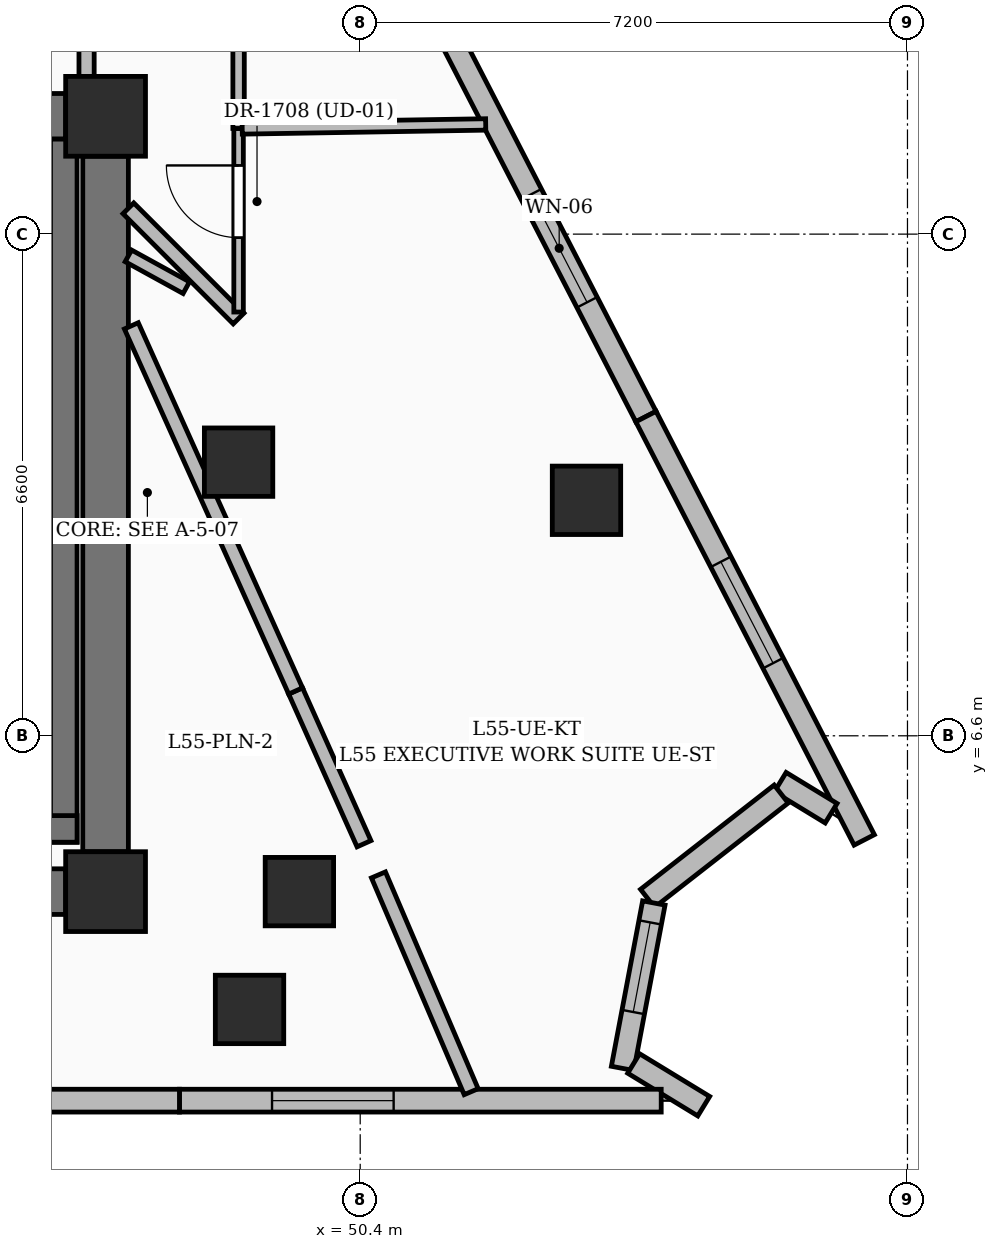
"""IFC4 building model, lengths in metres.
Left out: names, types, materials, properties, quantities, classifications, styles, units other than length and angle.
Written with IfcOpenShell. Run it as: python <this file> out.ifc"""

import sys

from ifc_helpers import new_model, si_unit, direction, frame, frame_2d, origin, origin_2d, place, context, subcontext, project, spatial, rectangle, extrude, element, fill, save


model = new_model("IFC4")
c1 = context("Model", 3, precision=1e-05, world=origin(), true_north=direction((0.0, 1.0)))
c2 = subcontext(c1, "Body", "Model", "MODEL_VIEW")
j1 = project(units=[si_unit("LENGTHUNIT", "METRE"), si_unit("PLANEANGLEUNIT", "RADIAN")], contexts=[c1])
p1 = place(None, origin())
s1 = spatial("IfcSite", under=j1, at=p1, CompositionType="ELEMENT")
p2 = place(p1, origin())
s2 = spatial("IfcBuilding", under=s1, at=p2, CompositionType="ELEMENT")
p3 = place(p2, frame((0.0, 0.0, 214.5)))
s3 = spatial("IfcBuildingStorey", under=s2, at=p3, CompositionType="ELEMENT", Elevation=214.5)
for number, where, z_axis, x_axis in (
    (1, (47.05, 4.55, 0.0), (0.0, 0.0, 1.0), (1.0, 0.0, 0.0)),
    (2, (47.05, 14.75, 0.0), (0.0, 0.0, 1.0), (1.0, 0.0, 0.0)),
):
    element("IfcColumn", number, at=place(p3, frame(where, z_axis=z_axis, x_axis=x_axis)), inside=s3, PredefinedType="COLUMN", context=c2, shape_type="SweptSolid", body=[
        extrude(rectangle(XDim=1.05, YDim=1.05, at=origin_2d()), origin(), (0.0, 0.0, 1.0), 3.75),
    ])
for number, where, z_axis, x_axis in (
    (3, (49.6, 4.55, 0.0), (0.0, 0.0, 1.0), (1.0, 0.0, 0.0)),
    (4, (48.8, 10.2, 0.0), (0.0, 0.0, 1.0), (1.0, 0.0, 0.0)),
):
    element("IfcColumn", number, at=place(p3, frame(where, z_axis=z_axis, x_axis=x_axis)), inside=s3, PredefinedType="COLUMN", context=c2, shape_type="SweptSolid", body=[
        extrude(rectangle(XDim=0.9, YDim=0.9, at=origin_2d()), origin(), (0.0, 0.0, 1.0), 3.75),
    ])
p4 = place(p3, frame((35.675, 4.55, 0.0), z_axis=(0.0, 0.0, 1.0), x_axis=(1.0, 0.0, 0.0)))
e5 = element("IfcWall", 5, at=p4, inside=s3, PredefinedType="SHEAR", context=c2, shape_type="SweptSolid", body=[
    extrude(rectangle(XDim=10.85, YDim=0.6, at=frame_2d((5.425, 0.0))), origin(), (0.0, 0.0, 1.0), 3.75),
])
p5 = place(p3, frame((35.675, 14.75, 0.0), z_axis=(0.0, 0.0, 1.0), x_axis=(1.0, 0.0, 0.0)))
e6 = element("IfcWall", 6, at=p5, inside=s3, PredefinedType="SHEAR", context=c2, shape_type="SweptSolid", body=[
    extrude(rectangle(XDim=10.85, YDim=0.6, at=frame_2d((5.425, 0.0))), origin(), (0.0, 0.0, 1.0), 3.75),
])
p6 = place(p5, frame((1.1, 0.0, 0.0)))
e7 = element("IfcOpeningElement", 7, at=p6, cuts=e6, PredefinedType="OPENING", context=c2, shape_type="SweptSolid", body=[
    extrude(rectangle(XDim=1.05, YDim=2.15, at=frame_2d((0.525, 1.075))), frame((0.0, 0.31, 0.0), z_axis=(0.0, -1.0, 0.0), x_axis=(1.0, 0.0, 0.0)), (0.0, 0.0, 1.0), 0.62),
])
p7 = place(p5, frame((8.7, 0.0, 0.0)))
e8 = element("IfcOpeningElement", 8, at=p7, cuts=e6, PredefinedType="OPENING", context=c2, shape_type="SweptSolid", body=[
    extrude(rectangle(XDim=1.05, YDim=2.15, at=frame_2d((0.525, 1.075))), frame((0.0, 0.31, 0.0), z_axis=(0.0, -1.0, 0.0), x_axis=(1.0, 0.0, 0.0)), (0.0, 0.0, 1.0), 0.62),
])
p8 = place(p5, frame((3.825, 0.0, 0.0)))
e9 = element("IfcOpeningElement", 9, at=p8, cuts=e6, PredefinedType="OPENING", context=c2, shape_type="SweptSolid", body=[
    extrude(rectangle(XDim=1.2, YDim=2.2, at=frame_2d((0.6, 1.1))), frame((0.0, 0.31, 0.0), z_axis=(0.0, -1.0, 0.0), x_axis=(1.0, 0.0, 0.0)), (0.0, 0.0, 1.0), 0.62),
])
p9 = place(p5, frame((5.825, 0.0, 0.0)))
e10 = element("IfcOpeningElement", 10, at=p9, cuts=e6, PredefinedType="OPENING", context=c2, shape_type="SweptSolid", body=[
    extrude(rectangle(XDim=1.2, YDim=2.2, at=frame_2d((0.6, 1.1))), frame((0.0, 0.31, 0.0), z_axis=(0.0, -1.0, 0.0), x_axis=(1.0, 0.0, 0.0)), (0.0, 0.0, 1.0), 0.62),
])
p10 = place(p3, frame((47.05, 5.075, 0.0), z_axis=(0.0, 0.0, 1.0), x_axis=(0.0, 1.0, 0.0)))
e11 = element("IfcWall", 11, at=p10, inside=s3, PredefinedType="SHEAR", context=c2, shape_type="SweptSolid", body=[
    extrude(rectangle(XDim=9.15, YDim=0.6, at=frame_2d((4.575, 0.0))), origin(), (0.0, 0.0, 1.0), 3.75),
])
p11 = place(p3, frame((46.5, 5.2, 0.0), z_axis=(0.0, 0.0, 1.0), x_axis=(0.0, 1.0, 0.0)))
e12 = element("IfcWall", 12, at=p11, inside=s3, PredefinedType="SOLIDWALL", context=c2, shape_type="SweptSolid", body=[
    extrude(rectangle(XDim=9.25, YDim=0.35, at=frame_2d((4.625, 0.0))), origin(), (0.0, 0.0, 1.0), 3.75),
])
p12 = place(p3, frame((43.125, 5.375, 0.0), z_axis=(0.0, 0.0, 1.0), x_axis=(1.0, 0.0, 0.0)))
e13 = element("IfcWall", 13, at=p12, inside=s3, PredefinedType="SOLIDWALL", context=c2, shape_type="SweptSolid", body=[
    extrude(rectangle(XDim=3.55, YDim=0.35, at=frame_2d((1.775, 0.0))), origin(), (0.0, 0.0, 1.0), 3.75),
])
for number, where, z_axis, x_axis in (
    (14, (48.944, 3.0, 0.0), (0.0, 0.0, 1.0), (1.0, 0.0, 0.0)),
    (15, (53.377, 9.698, 0.0), (0.0, 0.0, 1.0), (1.0, 0.0, 0.0)),
):
    element("IfcColumn", number, at=place(p3, frame(where, z_axis=z_axis, x_axis=x_axis)), inside=s3, PredefinedType="COLUMN", context=c2, shape_type="SweptSolid", body=[
        extrude(rectangle(XDim=0.9, YDim=0.9, at=origin_2d()), origin(), (0.0, 0.0, 1.0), 3.75),
    ])
p13 = place(p3, frame((51.288, 16.369, 0.0), z_axis=(0.0, 0.0, 1.0), x_axis=(0.458306446078, -0.88879424024, 0.0)))
e16 = element("IfcWall", 16, at=p13, inside=s3, PredefinedType="SOLIDWALL", context=c2, shape_type="SweptSolid", body=[
    extrude(rectangle(XDim=6.266, YDim=0.3, at=frame_2d((3.133, 0.0))), origin(), (0.0, 0.0, 1.0), 3.5),
])
p14 = place(p13, frame((2.975, 0.0, 0.55)))
e17 = element("IfcOpeningElement", 17, at=p14, cuts=e16, PredefinedType="OPENING", context=c2, shape_type="SweptSolid", body=[
    extrude(rectangle(XDim=1.6, YDim=2.2, at=frame_2d((0.8, 1.1))), frame((0.0, 0.16, 0.0), z_axis=(0.0, -1.0, 0.0), x_axis=(1.0, 0.0, 0.0)), (0.0, 0.0, 1.0), 0.32),
])
p15 = place(p3, frame((54.159, 10.8, 0.0), z_axis=(0.0, 0.0, 1.0), x_axis=(0.458322317218, -0.888786056113, 0.0)))
e18 = element("IfcWall", 18, at=p15, inside=s3, PredefinedType="SOLIDWALL", context=c2, shape_type="SweptSolid", body=[
    extrude(rectangle(XDim=6.266, YDim=0.3, at=frame_2d((3.133, 0.0))), origin(), (0.0, 0.0, 1.0), 3.5),
])
p16 = place(p15, frame((2.15, 0.0, 0.6)))
e19 = element("IfcOpeningElement", 19, at=p16, cuts=e18, PredefinedType="OPENING", context=c2, shape_type="SweptSolid", body=[
    extrude(rectangle(XDim=1.5, YDim=2.1, at=frame_2d((0.75, 1.05))), frame((0.0, 0.16, 0.0), z_axis=(0.0, -1.0, 0.0), x_axis=(1.0, 0.0, 0.0)), (0.0, 0.0, 1.0), 0.32),
])
p17 = place(p3, frame((56.595, 5.581, 0.0), z_axis=(0.0, 0.0, 1.0), x_axis=(-0.853681479387, 0.520795479772, 0.0)))
e20 = element("IfcWall", 20, at=p17, inside=s3, PredefinedType="SOLIDWALL", context=c2, shape_type="SweptSolid", body=[
    extrude(rectangle(XDim=0.785, YDim=0.3, at=frame_2d((0.392, 0.0))), origin(), (0.0, 0.0, 1.0), 3.5),
])
p18 = place(p3, frame((55.939, 5.834, 0.0), z_axis=(0.0, 0.0, 1.0), x_axis=(-0.788331324268, -0.615250943256, 0.0)))
e21 = element("IfcWall", 21, at=p18, inside=s3, PredefinedType="SOLIDWALL", context=c2, shape_type="SweptSolid", body=[
    extrude(rectangle(XDim=2.23, YDim=0.3, at=frame_2d((1.115, 0.0))), origin(), (0.0, 0.0, 1.0), 3.5),
])
p19 = place(p3, frame((54.263, 4.401, 0.0), z_axis=(0.0, 0.0, 1.0), x_axis=(-0.185632792315, -0.982619186876, 0.0)))
e22 = element("IfcWall", 22, at=p19, inside=s3, PredefinedType="SOLIDWALL", context=c2, shape_type="SweptSolid", body=[
    extrude(rectangle(XDim=2.215, YDim=0.3, at=frame_2d((1.107, 0.0))), origin(), (0.0, 0.0, 1.0), 3.5),
])
p20 = place(p19, frame((0.26, 0.0, 0.8)))
e23 = element("IfcOpeningElement", 23, at=p20, cuts=e22, PredefinedType="OPENING", context=c2, shape_type="SweptSolid", body=[
    extrude(rectangle(XDim=1.2, YDim=1.8, at=frame_2d((0.6, 0.9))), frame((0.0, 0.16, 0.0), z_axis=(0.0, -1.0, 0.0), x_axis=(1.0, 0.0, 0.0)), (0.0, 0.0, 1.0), 0.32),
])
p21 = place(p3, frame((53.998, 2.289, 0.0), z_axis=(0.0, 0.0, 1.0), x_axis=(0.853840299064, -0.520535055203, 0.0)))
e24 = element("IfcWall", 24, at=p21, inside=s3, PredefinedType="SOLIDWALL", context=c2, shape_type="SweptSolid", body=[
    extrude(rectangle(XDim=1.08, YDim=0.3, at=frame_2d((0.54, 0.0))), origin(), (0.0, 0.0, 1.0), 3.5),
])
p22 = place(p3, frame((54.36, 1.8, 0.0), z_axis=(0.0, 0.0, 1.0), x_axis=(-1.0, 0.0, 0.0)))
e25 = element("IfcWall", 25, at=p22, inside=s3, PredefinedType="SOLIDWALL", context=c2, shape_type="SweptSolid", body=[
    extrude(rectangle(XDim=6.338, YDim=0.3, at=frame_2d((3.169, 0.0))), origin(), (0.0, 0.0, 1.0), 3.5),
])
p23 = place(p22, frame((3.52, 0.0, 0.55)))
e26 = element("IfcOpeningElement", 26, at=p23, cuts=e25, PredefinedType="OPENING", context=c2, shape_type="SweptSolid", body=[
    extrude(rectangle(XDim=1.6, YDim=2.2, at=frame_2d((0.8, 1.1))), frame((0.0, 0.16, 0.0), z_axis=(0.0, -1.0, 0.0), x_axis=(1.0, 0.0, 0.0)), (0.0, 0.0, 1.0), 0.32),
])
p24 = place(p3, frame((48.022, 1.8, 0.0), z_axis=(0.0, 0.0, 1.0), x_axis=(-1.0, 0.0, 0.0)))
e27 = element("IfcWall", 27, at=p24, inside=s3, PredefinedType="SOLIDWALL", context=c2, shape_type="SweptSolid", body=[
    extrude(rectangle(XDim=6.918, YDim=0.3, at=frame_2d((3.459, 0.0))), origin(), (0.0, 0.0, 1.0), 3.5),
])
p25 = place(p24, frame((3.025, 0.0, 0.6)))
e28 = element("IfcOpeningElement", 28, at=p25, cuts=e27, PredefinedType="OPENING", context=c2, shape_type="SweptSolid", body=[
    extrude(rectangle(XDim=1.5, YDim=2.1, at=frame_2d((0.75, 1.05))), frame((0.0, 0.16, 0.0), z_axis=(0.0, -1.0, 0.0), x_axis=(1.0, 0.0, 0.0)), (0.0, 0.0, 1.0), 0.32),
])
p26 = place(p3, frame((46.8, 15.05, 0.0), z_axis=(0.0, 0.0, 1.0), x_axis=(0.0, 1.0, 0.0)))
e29 = element("IfcWall", 29, at=p26, inside=s3, PredefinedType="PARTITIONING", context=c2, shape_type="SweptSolid", body=[
    extrude(rectangle(XDim=1.7, YDim=0.2, at=frame_2d((0.85, 0.0))), origin(), (0.0, 0.0, 1.0), 2.685),
])
p27 = place(p3, frame((50.45, 5.18, 0.0), z_axis=(0.0, 0.0, 1.0), x_axis=(-0.408626143047, 0.912701854506, 0.0)))
e30 = element("IfcWall", 30, at=p27, inside=s3, PredefinedType="PARTITIONING", context=c2, shape_type="SweptSolid", body=[
    extrude(rectangle(XDim=2.202, YDim=0.2, at=frame_2d((1.101, 0.0))), origin(), (0.0, 0.0, 1.0), 2.82),
])
p28 = place(p3, frame((51.86, 1.918, 0.0), z_axis=(0.0, 0.0, 1.0), x_axis=(-0.393349316575, 0.919389098886, 0.0)))
e31 = element("IfcWall", 31, at=p28, inside=s3, PredefinedType="PARTITIONING", context=c2, shape_type="SweptSolid", body=[
    extrude(rectangle(XDim=3.102, YDim=0.2, at=frame_2d((1.551, 0.0))), origin(), (0.0, 0.0, 1.0), 3.5),
])
p29 = place(p3, frame((49.55, 7.19, 0.0), z_axis=(0.0, 0.0, 1.0), x_axis=(-0.410297221829, 0.91195185715, 0.0)))
e32 = element("IfcWall", 32, at=p29, inside=s3, PredefinedType="PARTITIONING", context=c2, shape_type="SweptSolid", body=[
    extrude(rectangle(XDim=5.267, YDim=0.2, at=frame_2d((2.634, 0.0))), origin(), (0.0, 0.0, 1.0), 2.685),
])
p30 = place(p3, frame((48.8, 12.09, 0.0), z_axis=(0.0, 0.0, 1.0), x_axis=(-0.707106781187, 0.707106781187, 0.0)))
e33 = element("IfcWall", 33, at=p30, inside=s3, PredefinedType="PARTITIONING", context=c2, shape_type="SweptSolid", body=[
    extrude(rectangle(XDim=2.051, YDim=0.2, at=frame_2d((1.025, 0.0))), origin(), (0.0, 0.0, 1.0), 3.5),
])
p31 = place(p3, frame((48.8, 12.175, 0.0), z_axis=(0.0, 0.0, 1.0), x_axis=(0.0, 1.0, 0.0)))
e34 = element("IfcWall", 34, at=p31, inside=s3, PredefinedType="PARTITIONING", context=c2, shape_type="SweptSolid", body=[
    extrude(rectangle(XDim=2.415, YDim=0.125, at=frame_2d((1.208, 0.0))), origin(), (0.0, 0.0, 1.0), 2.859),
])
p32 = place(p31, frame((0.979, 0.0, 0.0)))
e35 = element("IfcOpeningElement", 35, at=p32, cuts=e34, PredefinedType="OPENING", context=c2, shape_type="SweptSolid", body=[
    extrude(rectangle(XDim=0.95, YDim=2.2, at=frame_2d((0.475, 1.1))), frame((0.0, 0.072, 0.0), z_axis=(0.0, -1.0, 0.0), x_axis=(1.0, 0.0, 0.0)), (0.0, 0.0, 1.0), 0.145),
])
p33 = place(p3, frame((48.8, 14.59, 0.0), z_axis=(0.0, 0.0, 1.0), x_axis=(0.0, 1.0, 0.0)))
e36 = element("IfcWall", 36, at=p33, inside=s3, PredefinedType="PARTITIONING", context=c2, shape_type="SweptSolid", body=[
    extrude(rectangle(XDim=2.57, YDim=0.15, at=frame_2d((1.285, 0.0))), origin(), (0.0, 0.0, 1.0), 2.685),
])
p34 = place(p3, frame((52.051, 14.643, 0.0), z_axis=(0.0, 0.0, 1.0), x_axis=(-0.999865797865, -0.016382498593, 0.0)))
e37 = element("IfcWall", 37, at=p34, inside=s3, PredefinedType="PARTITIONING", context=c2, shape_type="SweptSolid", body=[
    extrude(rectangle(XDim=3.204, YDim=0.15, at=frame_2d((1.602, 0.0))), origin(), (0.0, 0.0, 1.0), 2.82),
])
p35 = place(p3, frame((47.35, 12.914, 0.0), z_axis=(0.0, 0.0, 1.0), x_axis=(0.876281108122, -0.481800186331, 0.0)))
e38 = element("IfcWall", 38, at=p35, inside=s3, PredefinedType="PARTITIONING", context=c2, shape_type="SweptSolid", body=[
    extrude(rectangle(XDim=0.87, YDim=0.175, at=frame_2d((0.435, 0.0))), origin(), (0.0, 0.0, 1.0), 3.5),
])
p36 = place(p14, origin())
e39 = element("IfcWindow", 39, at=p36, inside=s3, PartitioningType="SINGLE_PANEL", PredefinedType="WINDOW", context=c2, shape_type="SweptSolid", body=[
    extrude(rectangle(XDim=1.6, YDim=2.2, at=frame_2d((0.8, 1.1))), frame((0.0, 0.03, 0.0), z_axis=(0.0, -1.0, 0.0), x_axis=(1.0, 0.0, 0.0)), (0.0, 0.0, 1.0), 0.06),
])
fill(e17, e39)
p37 = place(p16, origin())
e40 = element("IfcWindow", 40, at=p37, inside=s3, PartitioningType="SINGLE_PANEL", PredefinedType="WINDOW", context=c2, shape_type="SweptSolid", body=[
    extrude(rectangle(XDim=1.5, YDim=2.1, at=frame_2d((0.75, 1.05))), frame((0.0, 0.03, 0.0), z_axis=(0.0, -1.0, 0.0), x_axis=(1.0, 0.0, 0.0)), (0.0, 0.0, 1.0), 0.06),
])
fill(e19, e40)
p38 = place(p20, origin())
e41 = element("IfcWindow", 41, at=p38, inside=s3, PartitioningType="SINGLE_PANEL", PredefinedType="WINDOW", context=c2, shape_type="SweptSolid", body=[
    extrude(rectangle(XDim=1.2, YDim=1.8, at=frame_2d((0.6, 0.9))), frame((0.0, 0.03, 0.0), z_axis=(0.0, -1.0, 0.0), x_axis=(1.0, 0.0, 0.0)), (0.0, 0.0, 1.0), 0.06),
])
fill(e23, e41)
p39 = place(p23, origin())
e42 = element("IfcWindow", 42, at=p39, inside=s3, PartitioningType="SINGLE_PANEL", PredefinedType="WINDOW", context=c2, shape_type="SweptSolid", body=[
    extrude(rectangle(XDim=1.6, YDim=2.2, at=frame_2d((0.8, 1.1))), frame((0.0, 0.03, 0.0), z_axis=(0.0, -1.0, 0.0), x_axis=(1.0, 0.0, 0.0)), (0.0, 0.0, 1.0), 0.06),
])
fill(e26, e42)
p40 = place(p32, origin())
e43 = element("IfcDoor", 43, at=p40, inside=s3, OperationType="SINGLE_SWING_RIGHT", PredefinedType="DOOR", context=c2, shape_type="SweptSolid", body=[
    extrude(rectangle(XDim=0.95, YDim=2.2, at=frame_2d((0.475, 1.1))), frame((0.0, 0.025, 0.0), z_axis=(0.0, -1.0, 0.0), x_axis=(1.0, 0.0, 0.0)), (0.0, 0.0, 1.0), 0.05),
])
fill(e35, e43)
save(model, sys.argv[1])
